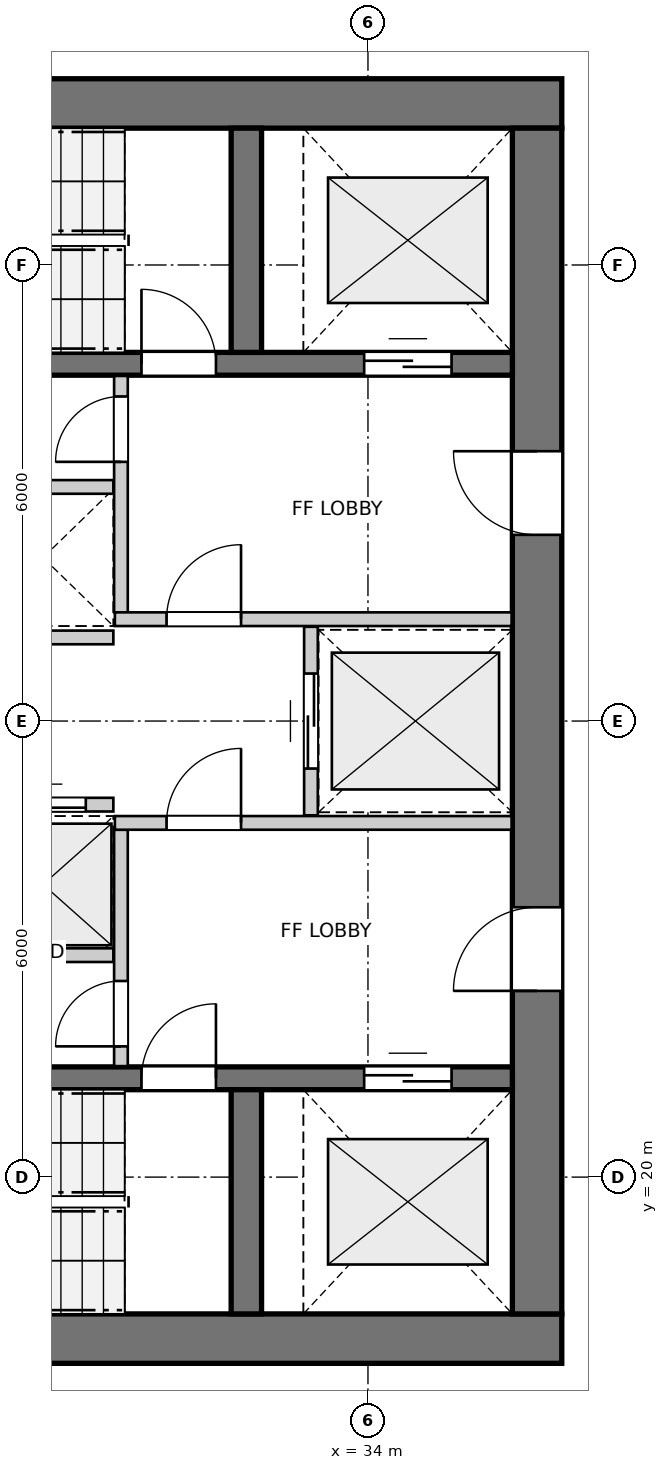
"""IFC4 building model, lengths in metres.
Left out: names, types, materials, properties, quantities, classifications, styles, units other than length and angle.
Written with IfcOpenShell. Run it as: python <this file> out.ifc"""

import sys

from ifc_helpers import new_model, si_unit, direction, frame, frame_2d, origin, place, context, subcontext, project, spatial, rectangle, extrude, source, transform, mapped, element, fill, save


model = new_model("IFC4")
c1 = context("Model", 3, precision=1e-05, world=origin(), true_north=direction((0.0, 1.0)))
c2 = subcontext(c1, "Body", "Model", "MODEL_VIEW")
j1 = project(units=[si_unit("LENGTHUNIT", "METRE"), si_unit("PLANEANGLEUNIT", "RADIAN")], contexts=[c1])
p1 = place(None, origin())
s1 = spatial("IfcSite", under=j1, at=p1, CompositionType="ELEMENT")
p2 = place(p1, origin())
s2 = spatial("IfcBuilding", under=s1, at=p2, CompositionType="ELEMENT")
p3 = place(p2, frame((0.0, 0.0, 102.4)))
s3 = spatial("IfcBuildingStorey", under=s2, at=p3, CompositionType="ELEMENT", Elevation=102.4)
for number, where, z_axis, x_axis in (
    (1, (24.15, 17.875, 0.0), (0.0, 0.0, 1.0), (1.0, 0.0, 0.0)),
    (2, (36.55, 34.125, 0.0), (0.0, 0.0, 1.0), (-1.0, 0.0, 0.0)),
):
    element("IfcWall", number, at=place(p3, frame(where, z_axis=z_axis, x_axis=x_axis)), inside=s3, PredefinedType="SHEAR", context=c2, shape_type="SweptSolid", body=[
        extrude(rectangle(XDim=12.4, YDim=0.65, at=frame_2d((6.2, 0.0))), origin(), (0.0, 0.0, 1.0), 2.95),
    ])
p4 = place(p3, frame((36.225, 18.2, 0.0), z_axis=(0.0, 0.0, 1.0), x_axis=(0.0, 1.0, 0.0)))
e3 = element("IfcWall", 3, at=p4, inside=s3, PredefinedType="SHEAR", context=c2, shape_type="SweptSolid", body=[
    extrude(rectangle(XDim=15.6, YDim=0.65, at=frame_2d((7.8, 0.0))), origin(), (0.0, 0.0, 1.0), 2.95),
])
p5 = place(p4, frame((4.25, 0.0, 0.0)))
e4 = element("IfcOpeningElement", 4, at=p5, cuts=e3, PredefinedType="OPENING", context=c2, shape_type="SweptSolid", body=[
    extrude(rectangle(XDim=1.1, YDim=2.15, at=frame_2d((0.55, 1.075))), frame((0.0, 0.335, 0.0), z_axis=(0.0, -1.0, 0.0), x_axis=(1.0, 0.0, 0.0)), (0.0, 0.0, 1.0), 0.67),
])
p6 = place(p4, frame((10.25, 0.0, 0.0)))
e5 = element("IfcOpeningElement", 5, at=p6, cuts=e3, PredefinedType="OPENING", context=c2, shape_type="SweptSolid", body=[
    extrude(rectangle(XDim=1.1, YDim=2.15, at=frame_2d((0.55, 1.075))), frame((0.0, 0.335, 0.0), z_axis=(0.0, -1.0, 0.0), x_axis=(1.0, 0.0, 0.0)), (0.0, 0.0, 1.0), 0.67),
])
p7 = place(p3, frame((24.8, 21.3, 0.0), z_axis=(0.0, 0.0, 1.0), x_axis=(1.0, 0.0, 0.0)))
e6 = element("IfcWall", 6, at=p7, inside=s3, PredefinedType="SHEAR", context=c2, shape_type="SweptSolid", body=[
    extrude(rectangle(XDim=11.1, YDim=0.3, at=frame_2d((5.55, 0.0))), origin(), (0.0, 0.0, 1.0), 2.95),
])
p8 = place(p7, frame((6.22, 0.0, 0.0)))
e7 = element("IfcOpeningElement", 7, at=p8, cuts=e6, PredefinedType="OPENING", context=c2, shape_type="SweptSolid", body=[
    extrude(rectangle(XDim=0.98, YDim=2.15, at=frame_2d((0.49, 1.075))), frame((0.0, 0.16, 0.0), z_axis=(0.0, -1.0, 0.0), x_axis=(1.0, 0.0, 0.0)), (0.0, 0.0, 1.0), 0.32),
])
p9 = place(p7, frame((9.15, 0.0, 0.0)))
e8 = element("IfcOpeningElement", 8, at=p9, cuts=e6, PredefinedType="OPENING", context=c2, shape_type="SweptSolid", body=[
    extrude(rectangle(XDim=1.15, YDim=2.15, at=frame_2d((0.575, 1.075))), frame((0.0, 0.16, 0.0), z_axis=(0.0, -1.0, 0.0), x_axis=(1.0, 0.0, 0.0)), (0.0, 0.0, 1.0), 0.32),
])
p10 = place(p3, frame((32.4, 18.2, 0.0), z_axis=(0.0, 0.0, 1.0), x_axis=(0.0, 1.0, 0.0)))
e9 = element("IfcWall", 9, at=p10, inside=s3, PredefinedType="SHEAR", context=c2, shape_type="SweptSolid", body=[
    extrude(rectangle(XDim=2.95, YDim=0.4, at=frame_2d((1.475, 0.0))), origin(), (0.0, 0.0, 1.0), 2.95),
])
p11 = place(p3, frame((24.8, 30.7, 0.0), z_axis=(0.0, 0.0, 1.0), x_axis=(1.0, 0.0, 0.0)))
e10 = element("IfcWall", 10, at=p11, inside=s3, PredefinedType="SHEAR", context=c2, shape_type="SweptSolid", body=[
    extrude(rectangle(XDim=11.1, YDim=0.3, at=frame_2d((5.55, 0.0))), origin(), (0.0, 0.0, 1.0), 2.95),
])
p12 = place(p11, frame((6.22, 0.0, 0.0)))
e11 = element("IfcOpeningElement", 11, at=p12, cuts=e10, PredefinedType="OPENING", context=c2, shape_type="SweptSolid", body=[
    extrude(rectangle(XDim=0.98, YDim=2.15, at=frame_2d((0.49, 1.075))), frame((0.0, 0.16, 0.0), z_axis=(0.0, -1.0, 0.0), x_axis=(1.0, 0.0, 0.0)), (0.0, 0.0, 1.0), 0.32),
])
p13 = place(p11, frame((9.15, 0.0, 0.0)))
e12 = element("IfcOpeningElement", 12, at=p13, cuts=e10, PredefinedType="OPENING", context=c2, shape_type="SweptSolid", body=[
    extrude(rectangle(XDim=1.15, YDim=2.15, at=frame_2d((0.575, 1.075))), frame((0.0, 0.16, 0.0), z_axis=(0.0, -1.0, 0.0), x_axis=(1.0, 0.0, 0.0)), (0.0, 0.0, 1.0), 0.32),
])
p14 = place(p3, frame((32.4, 30.85, 0.0), z_axis=(0.0, 0.0, 1.0), x_axis=(0.0, 1.0, 0.0)))
e13 = element("IfcWall", 13, at=p14, inside=s3, PredefinedType="SHEAR", context=c2, shape_type="SweptSolid", body=[
    extrude(rectangle(XDim=2.95, YDim=0.4, at=frame_2d((1.475, 0.0))), origin(), (0.0, 0.0, 1.0), 2.95),
])
p15 = place(p3, frame((30.75, 21.46, 0.0), z_axis=(0.0, 0.0, 1.0), x_axis=(0.0, 1.0, 0.0)))
e14 = element("IfcWall", 14, at=p15, inside=s3, PredefinedType="PARTITIONING", context=c2, shape_type="SweptSolid", body=[
    extrude(rectangle(XDim=3.11, YDim=0.18, at=frame_2d((1.555, 0.0))), origin(), (0.0, 0.0, 1.0), 2.95),
])
p16 = place(p15, frame((0.26, 0.0, 0.0)))
e15 = element("IfcOpeningElement", 15, at=p16, cuts=e14, PredefinedType="OPENING", context=c2, shape_type="SweptSolid", body=[
    extrude(rectangle(XDim=0.86, YDim=2.05, at=frame_2d((0.43, 1.025))), frame((0.0, 0.1, 0.0), z_axis=(0.0, -1.0, 0.0), x_axis=(1.0, 0.0, 0.0)), (0.0, 0.0, 1.0), 0.2),
])
p17 = place(p3, frame((30.67, 24.66, 0.0), z_axis=(0.0, 0.0, 1.0), x_axis=(1.0, 0.0, 0.0)))
e16 = element("IfcWall", 16, at=p17, inside=s3, PredefinedType="PARTITIONING", context=c2, shape_type="SweptSolid", body=[
    extrude(rectangle(XDim=5.22, YDim=0.18, at=frame_2d((2.61, 0.0))), origin(), (0.0, 0.0, 1.0), 2.95),
])
p18 = place(p17, frame((0.68, 0.0, 0.0)))
e17 = element("IfcOpeningElement", 17, at=p18, cuts=e16, PredefinedType="OPENING", context=c2, shape_type="SweptSolid", body=[
    extrude(rectangle(XDim=0.98, YDim=2.15, at=frame_2d((0.49, 1.075))), frame((0.0, 0.1, 0.0), z_axis=(0.0, -1.0, 0.0), x_axis=(1.0, 0.0, 0.0)), (0.0, 0.0, 1.0), 0.2),
])
p19 = place(p3, frame((30.75, 27.43, 0.0), z_axis=(0.0, 0.0, 1.0), x_axis=(0.0, 1.0, 0.0)))
e18 = element("IfcWall", 18, at=p19, inside=s3, PredefinedType="PARTITIONING", context=c2, shape_type="SweptSolid", body=[
    extrude(rectangle(XDim=3.11, YDim=0.18, at=frame_2d((1.555, 0.0))), origin(), (0.0, 0.0, 1.0), 2.95),
])
p20 = place(p19, frame((1.98, 0.0, 0.0)))
e19 = element("IfcOpeningElement", 19, at=p20, cuts=e18, PredefinedType="OPENING", context=c2, shape_type="SweptSolid", body=[
    extrude(rectangle(XDim=0.86, YDim=2.05, at=frame_2d((0.43, 1.025))), frame((0.0, 0.1, 0.0), z_axis=(0.0, -1.0, 0.0), x_axis=(1.0, 0.0, 0.0)), (0.0, 0.0, 1.0), 0.2),
])
p21 = place(p3, frame((30.67, 27.34, 0.0), z_axis=(0.0, 0.0, 1.0), x_axis=(1.0, 0.0, 0.0)))
e20 = element("IfcWall", 20, at=p21, inside=s3, PredefinedType="PARTITIONING", context=c2, shape_type="SweptSolid", body=[
    extrude(rectangle(XDim=5.22, YDim=0.18, at=frame_2d((2.61, 0.0))), origin(), (0.0, 0.0, 1.0), 2.95),
])
p22 = place(p21, frame((0.68, 0.0, 0.0)))
e21 = element("IfcOpeningElement", 21, at=p22, cuts=e20, PredefinedType="OPENING", context=c2, shape_type="SweptSolid", body=[
    extrude(rectangle(XDim=0.98, YDim=2.15, at=frame_2d((0.49, 1.075))), frame((0.0, 0.1, 0.0), z_axis=(0.0, -1.0, 0.0), x_axis=(1.0, 0.0, 0.0)), (0.0, 0.0, 1.0), 0.2),
])
p23 = place(p3, frame((33.25, 24.76, 0.0), z_axis=(0.0, 0.0, 1.0), x_axis=(0.0, 1.0, 0.0)))
e22 = element("IfcWall", 22, at=p23, inside=s3, PredefinedType="PARTITIONING", context=c2, shape_type="SweptSolid", body=[
    extrude(rectangle(XDim=2.48, YDim=0.18, at=frame_2d((1.24, 0.0))), origin(), (0.0, 0.0, 1.0), 2.95),
])
p24 = place(p23, frame((0.615, 0.0, 0.0)))
e23 = element("IfcOpeningElement", 23, at=p24, cuts=e22, PredefinedType="OPENING", context=c2, shape_type="SweptSolid", body=[
    extrude(rectangle(XDim=1.25, YDim=2.15, at=frame_2d((0.625, 1.075))), frame((0.0, 0.1, 0.0), z_axis=(0.0, -1.0, 0.0), x_axis=(1.0, 0.0, 0.0)), (0.0, 0.0, 1.0), 0.2),
])
p25 = place(p3, frame((24.81, 22.92, 0.0), z_axis=(0.0, 0.0, 1.0), x_axis=(1.0, 0.0, 0.0)))
e24 = element("IfcWall", 24, at=p25, inside=s3, PredefinedType="PARTITIONING", context=c2, shape_type="SweptSolid", body=[
    extrude(rectangle(XDim=5.84, YDim=0.18, at=frame_2d((2.92, 0.0))), origin(), (0.0, 0.0, 1.0), 2.95),
])
p26 = place(p3, frame((28.825, 24.9, 0.0), z_axis=(0.0, 0.0, 1.0), x_axis=(1.0, 0.0, 0.0)))
e25 = element("IfcWall", 25, at=p26, inside=s3, PredefinedType="PARTITIONING", context=c2, shape_type="SweptSolid", body=[
    extrude(rectangle(XDim=1.825, YDim=0.18, at=frame_2d((0.913, 0.0))), origin(), (0.0, 0.0, 1.0), 2.95),
])
p27 = place(p26, frame((0.363, 0.0, 0.0)))
e26 = element("IfcOpeningElement", 26, at=p27, cuts=e25, PredefinedType="OPENING", context=c2, shape_type="SweptSolid", body=[
    extrude(rectangle(XDim=1.1, YDim=2.15, at=frame_2d((0.55, 1.075))), frame((0.0, 0.1, 0.0), z_axis=(0.0, -1.0, 0.0), x_axis=(1.0, 0.0, 0.0)), (0.0, 0.0, 1.0), 0.2),
])
p28 = place(p3, frame((24.81, 29.08, 0.0), z_axis=(0.0, 0.0, 1.0), x_axis=(1.0, 0.0, 0.0)))
e27 = element("IfcWall", 27, at=p28, inside=s3, PredefinedType="PARTITIONING", context=c2, shape_type="SweptSolid", body=[
    extrude(rectangle(XDim=5.84, YDim=0.18, at=frame_2d((2.92, 0.0))), origin(), (0.0, 0.0, 1.0), 2.95),
])
p29 = place(p3, frame((28.825, 27.1, 0.0), z_axis=(0.0, 0.0, 1.0), x_axis=(1.0, 0.0, 0.0)))
e28 = element("IfcWall", 28, at=p29, inside=s3, PredefinedType="PARTITIONING", context=c2, shape_type="SweptSolid", body=[
    extrude(rectangle(XDim=1.825, YDim=0.18, at=frame_2d((0.913, 0.0))), origin(), (0.0, 0.0, 1.0), 2.95),
])
m1 = source(origin(), c2, "Body", "SweptSolid", [
    extrude(rectangle(XDim=0.98, YDim=2.15, at=frame_2d((0.49, 1.075))), frame((0.0, 0.025, 0.0), z_axis=(0.0, -1.0, 0.0), x_axis=(1.0, 0.0, 0.0)), (0.0, 0.0, 1.0), 0.05),
])
p30 = place(p8, origin())
e29 = element("IfcDoor", 29, at=p30, inside=s3, OperationType="SINGLE_SWING_RIGHT", PredefinedType="DOOR", context=c2, shape_type="MappedRepresentation", body=[
    mapped(m1, transform((0.0, 0.0, 0.0), x_axis=(1.0, 0.0, 0.0), y_axis=(0.0, 1.0, 0.0), z_axis=(0.0, 0.0, 1.0), scale=1.0)),
])
fill(e7, e29)
m2 = source(origin(), c2, "Body", "SweptSolid", [
    extrude(rectangle(XDim=1.15, YDim=2.15, at=frame_2d((0.575, 1.075))), frame((0.0, 0.025, 0.0), z_axis=(0.0, -1.0, 0.0), x_axis=(1.0, 0.0, 0.0)), (0.0, 0.0, 1.0), 0.05),
])
p31 = place(p9, origin())
e30 = element("IfcDoor", 30, at=p31, inside=s3, OperationType="DOUBLE_DOOR_SLIDING", PredefinedType="DOOR", context=c2, shape_type="MappedRepresentation", body=[
    mapped(m2, transform((0.0, 0.0, 0.0), x_axis=(1.0, 0.0, 0.0), y_axis=(0.0, 1.0, 0.0), z_axis=(0.0, 0.0, 1.0), scale=1.0)),
])
fill(e8, e30)
p32 = place(p12, origin())
e31 = element("IfcDoor", 31, at=p32, inside=s3, OperationType="SINGLE_SWING_LEFT", PredefinedType="DOOR", context=c2, shape_type="MappedRepresentation", body=[
    mapped(m1, transform((0.0, 0.0, 0.0), x_axis=(1.0, 0.0, 0.0), y_axis=(0.0, 1.0, 0.0), z_axis=(0.0, 0.0, 1.0), scale=1.0)),
])
fill(e11, e31)
p33 = place(p13, origin())
e32 = element("IfcDoor", 32, at=p33, inside=s3, OperationType="DOUBLE_DOOR_SLIDING", PredefinedType="DOOR", context=c2, shape_type="MappedRepresentation", body=[
    mapped(m2, transform((0.0, 0.0, 0.0), x_axis=(1.0, 0.0, 0.0), y_axis=(0.0, 1.0, 0.0), z_axis=(0.0, 0.0, 1.0), scale=1.0)),
])
fill(e12, e32)
m3 = source(origin(), c2, "Body", "SweptSolid", [
    extrude(rectangle(XDim=1.1, YDim=2.15, at=frame_2d((0.55, 1.075))), frame((0.0, 0.025, 0.0), z_axis=(0.0, -1.0, 0.0), x_axis=(1.0, 0.0, 0.0)), (0.0, 0.0, 1.0), 0.05),
])
p34 = place(p5, origin())
e33 = element("IfcDoor", 33, at=p34, inside=s3, OperationType="SINGLE_SWING_LEFT", PredefinedType="DOOR", context=c2, shape_type="MappedRepresentation", body=[
    mapped(m3, transform((0.0, 0.0, 0.0), x_axis=(1.0, 0.0, 0.0), y_axis=(0.0, 1.0, 0.0), z_axis=(0.0, 0.0, 1.0), scale=1.0)),
])
fill(e4, e33)
p35 = place(p6, origin())
e34 = element("IfcDoor", 34, at=p35, inside=s3, OperationType="SINGLE_SWING_RIGHT", PredefinedType="DOOR", context=c2, shape_type="MappedRepresentation", body=[
    mapped(m3, transform((0.0, 0.0, 0.0), x_axis=(1.0, 0.0, 0.0), y_axis=(0.0, 1.0, 0.0), z_axis=(0.0, 0.0, 1.0), scale=1.0)),
])
fill(e5, e34)
m4 = source(origin(), c2, "Body", "SweptSolid", [
    extrude(rectangle(XDim=0.86, YDim=2.05, at=frame_2d((0.43, 1.025))), frame((0.0, 0.025, 0.0), z_axis=(0.0, -1.0, 0.0), x_axis=(1.0, 0.0, 0.0)), (0.0, 0.0, 1.0), 0.05),
])
p36 = place(p16, origin())
e35 = element("IfcDoor", 35, at=p36, inside=s3, OperationType="SINGLE_SWING_LEFT", PredefinedType="DOOR", context=c2, shape_type="MappedRepresentation", body=[
    mapped(m4, transform((0.0, 0.0, 0.0), x_axis=(1.0, 0.0, 0.0), y_axis=(0.0, 1.0, 0.0), z_axis=(0.0, 0.0, 1.0), scale=1.0)),
])
fill(e15, e35)
p37 = place(p18, origin())
e36 = element("IfcDoor", 36, at=p37, inside=s3, OperationType="SINGLE_SWING_RIGHT", PredefinedType="DOOR", context=c2, shape_type="MappedRepresentation", body=[
    mapped(m1, transform((0.0, 0.0, 0.0), x_axis=(1.0, 0.0, 0.0), y_axis=(0.0, 1.0, 0.0), z_axis=(0.0, 0.0, 1.0), scale=1.0)),
])
fill(e17, e36)
p38 = place(p20, origin())
e37 = element("IfcDoor", 37, at=p38, inside=s3, OperationType="SINGLE_SWING_LEFT", PredefinedType="DOOR", context=c2, shape_type="MappedRepresentation", body=[
    mapped(m4, transform((0.0, 0.0, 0.0), x_axis=(1.0, 0.0, 0.0), y_axis=(0.0, 1.0, 0.0), z_axis=(0.0, 0.0, 1.0), scale=1.0)),
])
fill(e19, e37)
p39 = place(p22, origin())
e38 = element("IfcDoor", 38, at=p39, inside=s3, OperationType="SINGLE_SWING_RIGHT", PredefinedType="DOOR", context=c2, shape_type="MappedRepresentation", body=[
    mapped(m1, transform((0.0, 0.0, 0.0), x_axis=(1.0, 0.0, 0.0), y_axis=(0.0, 1.0, 0.0), z_axis=(0.0, 0.0, 1.0), scale=1.0)),
])
fill(e21, e38)
m5 = source(origin(), c2, "Body", "SweptSolid", [
    extrude(rectangle(XDim=1.25, YDim=2.15, at=frame_2d((0.625, 1.075))), frame((0.0, 0.025, 0.0), z_axis=(0.0, -1.0, 0.0), x_axis=(1.0, 0.0, 0.0)), (0.0, 0.0, 1.0), 0.05),
])
p40 = place(p24, origin())
e39 = element("IfcDoor", 39, at=p40, inside=s3, OperationType="DOUBLE_DOOR_SLIDING", PredefinedType="DOOR", context=c2, shape_type="MappedRepresentation", body=[
    mapped(m5, transform((0.0, 0.0, 0.0), x_axis=(1.0, 0.0, 0.0), y_axis=(0.0, 1.0, 0.0), z_axis=(0.0, 0.0, 1.0), scale=1.0)),
])
fill(e23, e39)
p41 = place(p27, origin())
e40 = element("IfcDoor", 40, at=p41, inside=s3, OperationType="DOUBLE_DOOR_SLIDING", PredefinedType="DOOR", context=c2, shape_type="MappedRepresentation", body=[
    mapped(m3, transform((0.0, 0.0, 0.0), x_axis=(1.0, 0.0, 0.0), y_axis=(0.0, 1.0, 0.0), z_axis=(0.0, 0.0, 1.0), scale=1.0)),
])
fill(e26, e40)
save(model, sys.argv[1])
